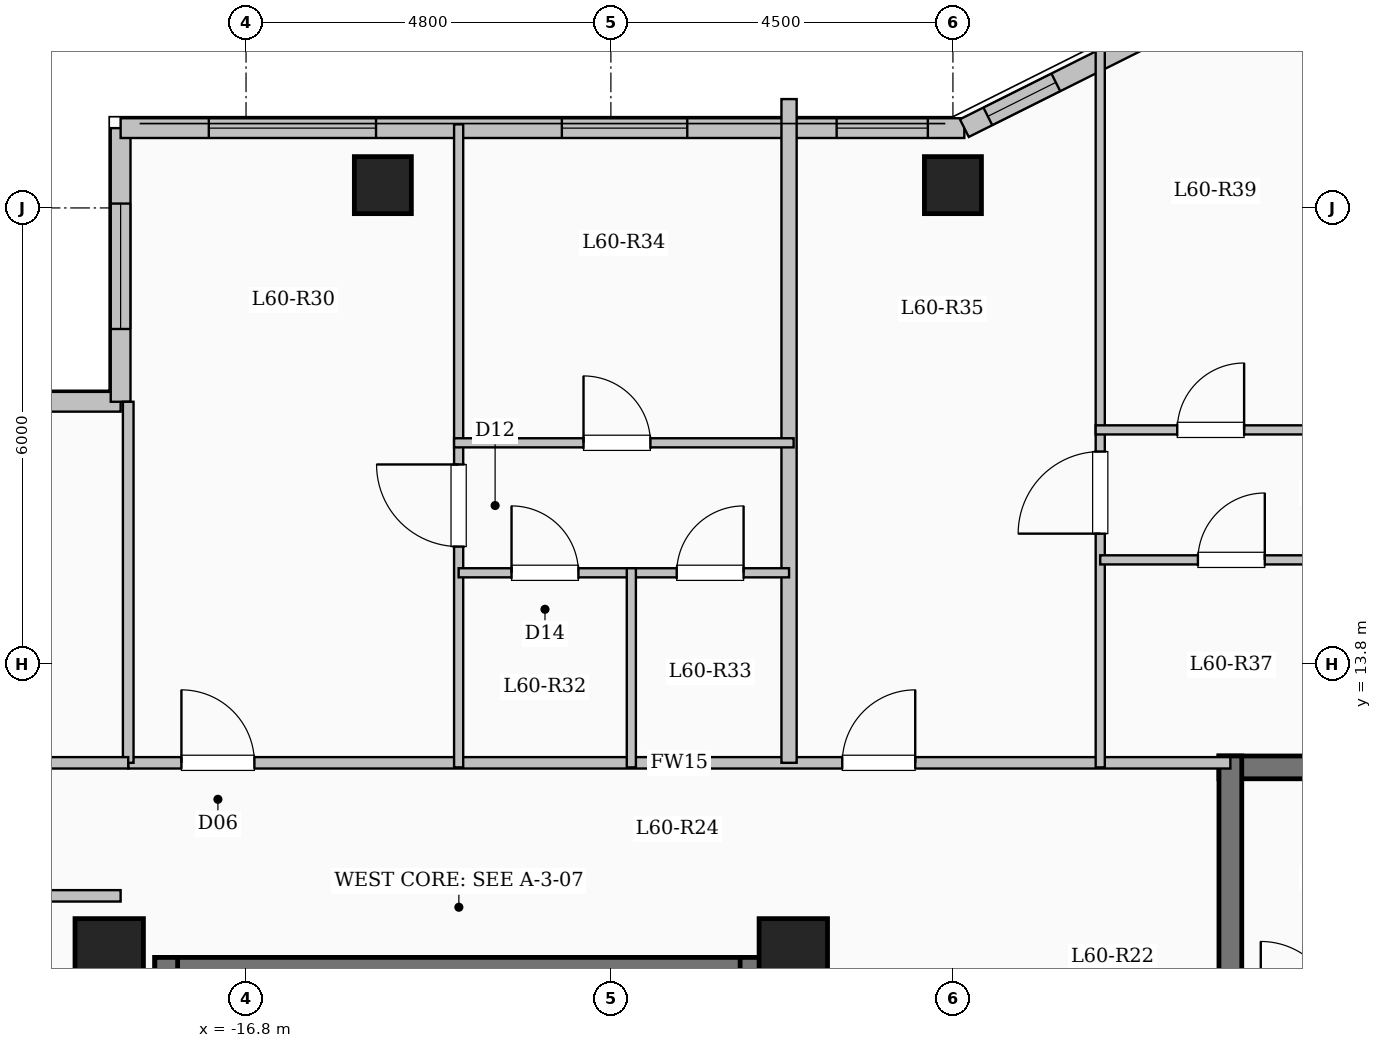
"""IFC4 building model, lengths in metres.
Left out: names, types, materials, properties, quantities, classifications, styles, units other than length and angle.
Written with IfcOpenShell. Run it as: python <this file> out.ifc"""

import sys

from ifc_helpers import new_model, si_unit, direction, frame, frame_2d, origin, origin_2d, place, context, subcontext, project, spatial, rectangle, extrude, element, fill, save


model = new_model("IFC4")
c1 = context("Model", 3, precision=1e-05, world=origin(), true_north=direction((0.0, 1.0)))
c2 = subcontext(c1, "Body", "Model", "MODEL_VIEW")
j1 = project(units=[si_unit("LENGTHUNIT", "METRE"), si_unit("PLANEANGLEUNIT", "RADIAN")], contexts=[c1])
p1 = place(None, origin())
s1 = spatial("IfcSite", under=j1, at=p1, CompositionType="ELEMENT")
p2 = place(p1, origin())
s2 = spatial("IfcBuilding", under=s1, at=p2, CompositionType="ELEMENT")
p3 = place(p2, frame((0.0, 0.0, 220.4)))
s3 = spatial("IfcBuildingStorey", under=s2, at=p3, CompositionType="ELEMENT", Elevation=220.4)
for number, where, z_axis, x_axis in (
    (1, (-9.6, 10.0, 0.0), (0.0, 0.0, 1.0), (1.0, 0.0, 0.0)),
    (2, (-18.6, 10.0, 0.0), (0.0, 0.0, 1.0), (1.0, 0.0, 0.0)),
):
    element("IfcColumn", number, at=place(p3, frame(where, z_axis=z_axis, x_axis=x_axis)), inside=s3, PredefinedType="COLUMN", context=c2, shape_type="SweptSolid", body=[
        extrude(rectangle(XDim=0.9, YDim=0.9, at=origin_2d()), origin(), (0.0, 0.0, 1.0), 3.35),
    ])
for number, where, z_axis, x_axis in (
    (3, (-15.0, 20.1, 0.0), (0.0, 0.0, 1.0), (1.0, 0.0, 0.0)),
    (4, (-7.5, 20.1, 0.0), (0.0, 0.0, 1.0), (1.0, 0.0, 0.0)),
):
    element("IfcColumn", number, at=place(p3, frame(where, z_axis=z_axis, x_axis=x_axis)), inside=s3, PredefinedType="COLUMN", context=c2, shape_type="SweptSolid", body=[
        extrude(rectangle(XDim=0.75, YDim=0.75, at=origin_2d()), origin(), (0.0, 0.0, 1.0), 3.35),
    ])
p4 = place(p3, frame((-23.55, 17.25, 0.0), z_axis=(0.0, 0.0, 1.0), x_axis=(1.0, 0.0, 0.0)))
e5 = element("IfcWall", 5, at=p4, inside=s3, PredefinedType="SOLIDWALL", context=c2, shape_type="SweptSolid", body=[
    extrude(rectangle(XDim=5.1, YDim=0.26, at=frame_2d((2.55, 0.0))), origin(), (0.0, 0.0, 1.0), 3.1),
])
p5 = place(p4, frame((1.575, 0.0, 0.9)))
e6 = element("IfcOpeningElement", 6, at=p5, cuts=e5, PredefinedType="OPENING", context=c2, shape_type="SweptSolid", body=[
    extrude(rectangle(XDim=2.0, YDim=1.7, at=frame_2d((1.0, 0.85))), frame((0.0, 0.14, 0.0), z_axis=(0.0, -1.0, 0.0), x_axis=(1.0, 0.0, 0.0)), (0.0, 0.0, 1.0), 0.28),
])
p6 = place(p3, frame((-18.45, 17.25, 0.0), z_axis=(0.0, 0.0, 1.0), x_axis=(0.0, 1.0, 0.0)))
e7 = element("IfcWall", 7, at=p6, inside=s3, PredefinedType="SOLIDWALL", context=c2, shape_type="SweptSolid", body=[
    extrude(rectangle(XDim=3.6, YDim=0.26, at=frame_2d((1.8, 0.0))), origin(), (0.0, 0.0, 1.0), 3.1),
])
p7 = place(p6, frame((0.958, 0.0, 0.9)))
e8 = element("IfcOpeningElement", 8, at=p7, cuts=e7, PredefinedType="OPENING", context=c2, shape_type="SweptSolid", body=[
    extrude(rectangle(XDim=1.65, YDim=1.6, at=frame_2d((0.825, 0.8))), frame((0.0, 0.14, 0.0), z_axis=(0.0, -1.0, 0.0), x_axis=(1.0, 0.0, 0.0)), (0.0, 0.0, 1.0), 0.28),
])
p8 = place(p3, frame((-18.45, 20.85, 0.0), z_axis=(0.0, 0.0, 1.0), x_axis=(1.0, 0.0, 0.0)))
e9 = element("IfcWall", 9, at=p8, inside=s3, PredefinedType="SOLIDWALL", context=c2, shape_type="SweptSolid", body=[
    extrude(rectangle(XDim=11.1, YDim=0.26, at=frame_2d((5.55, 0.0))), origin(), (0.0, 0.0, 1.0), 3.1),
])
p9 = place(p8, frame((1.16, 0.0, 0.9)))
e10 = element("IfcOpeningElement", 10, at=p9, cuts=e9, PredefinedType="OPENING", context=c2, shape_type="SweptSolid", body=[
    extrude(rectangle(XDim=2.2, YDim=1.75, at=frame_2d((1.1, 0.875))), frame((0.0, 0.14, 0.0), z_axis=(0.0, -1.0, 0.0), x_axis=(1.0, 0.0, 0.0)), (0.0, 0.0, 1.0), 0.28),
])
p10 = place(p8, frame((5.805, 0.0, 0.9)))
e11 = element("IfcOpeningElement", 11, at=p10, cuts=e9, PredefinedType="OPENING", context=c2, shape_type="SweptSolid", body=[
    extrude(rectangle(XDim=1.65, YDim=1.6, at=frame_2d((0.825, 0.8))), frame((0.0, 0.14, 0.0), z_axis=(0.0, -1.0, 0.0), x_axis=(1.0, 0.0, 0.0)), (0.0, 0.0, 1.0), 0.28),
])
p11 = place(p8, frame((9.42, 0.0, 0.95)))
e12 = element("IfcOpeningElement", 12, at=p11, cuts=e9, PredefinedType="OPENING", context=c2, shape_type="SweptSolid", body=[
    extrude(rectangle(XDim=1.2, YDim=1.5, at=frame_2d((0.6, 0.75))), frame((0.0, 0.14, 0.0), z_axis=(0.0, -1.0, 0.0), x_axis=(1.0, 0.0, 0.0)), (0.0, 0.0, 1.0), 0.28),
])
p12 = place(p3, frame((-7.35, 20.85, 0.0), z_axis=(0.0, 0.0, 1.0), x_axis=(0.894427191, 0.4472135955, 0.0)))
e13 = element("IfcWall", 13, at=p12, inside=s3, PredefinedType="SOLIDWALL", context=c2, shape_type="SweptSolid", body=[
    extrude(rectangle(XDim=3.354, YDim=0.26, at=frame_2d((1.677, 0.0))), origin(), (0.0, 0.0, 1.0), 3.1),
])
p13 = place(p12, frame((0.346, 0.0, 0.95)))
e14 = element("IfcOpeningElement", 14, at=p13, cuts=e13, PredefinedType="OPENING", context=c2, shape_type="SweptSolid", body=[
    extrude(rectangle(XDim=1.0, YDim=1.5, at=frame_2d((0.5, 0.75))), frame((0.0, 0.14, 0.0), z_axis=(0.0, -1.0, 0.0), x_axis=(1.0, 0.0, 0.0)), (0.0, 0.0, 1.0), 0.28),
])
p14 = place(p3, frame((-18.0, 9.79, 0.0), z_axis=(0.0, 0.0, 1.0), x_axis=(1.0, 0.0, 0.0)))
e15 = element("IfcWall", 15, at=p14, inside=s3, PredefinedType="SHEAR", context=c2, shape_type="SweptSolid", body=[
    extrude(rectangle(XDim=8.0, YDim=0.3, at=frame_2d((4.0, 0.0))), origin(), (0.0, 0.0, 1.0), 3.35),
])
for number, where, z_axis, x_axis in (
    (16, (-17.85, 6.35, 0.0), (0.0, 0.0, 1.0), (0.0, 1.0, 0.0)),
    (17, (-10.15, 6.35, 0.0), (0.0, 0.0, 1.0), (0.0, 1.0, 0.0)),
):
    element("IfcWall", number, at=place(p3, frame(where, z_axis=z_axis, x_axis=x_axis)), inside=s3, PredefinedType="SHEAR", context=c2, shape_type="SweptSolid", body=[
        extrude(rectangle(XDim=3.59, YDim=0.3, at=frame_2d((1.795, 0.0))), origin(), (0.0, 0.0, 1.0), 3.35),
    ])
p15 = place(p3, frame((-4.0, 12.44, 0.0), z_axis=(0.0, 0.0, 1.0), x_axis=(1.0, 0.0, 0.0)))
e18 = element("IfcWall", 18, at=p15, inside=s3, PredefinedType="SHEAR", context=c2, shape_type="SweptSolid", body=[
    extrude(rectangle(XDim=8.0, YDim=0.3, at=frame_2d((4.0, 0.0))), origin(), (0.0, 0.0, 1.0), 3.35),
])
p16 = place(p3, frame((-3.85, 9.0, 0.0), z_axis=(0.0, 0.0, 1.0), x_axis=(0.0, 1.0, 0.0)))
e19 = element("IfcWall", 19, at=p16, inside=s3, PredefinedType="SHEAR", context=c2, shape_type="SweptSolid", body=[
    extrude(rectangle(XDim=3.59, YDim=0.3, at=frame_2d((1.795, 0.0))), origin(), (0.0, 0.0, 1.0), 3.35),
])
p17 = place(p3, frame((-18.35, 12.5, 0.0), z_axis=(0.0, 0.0, 1.0), x_axis=(1.0, 0.0, 0.0)))
e20 = element("IfcWall", 20, at=p17, inside=s3, PredefinedType="PARTITIONING", context=c2, shape_type="SweptSolid", body=[
    extrude(rectangle(XDim=14.5, YDim=0.15, at=frame_2d((7.25, 0.0))), origin(), (0.0, 0.0, 1.0), 3.1),
])
p18 = place(p17, frame((0.7, 0.0, 0.0)))
e21 = element("IfcOpeningElement", 21, at=p18, cuts=e20, PredefinedType="OPENING", context=c2, shape_type="SweptSolid", body=[
    extrude(rectangle(XDim=0.96, YDim=2.15, at=frame_2d((0.48, 1.075))), frame((0.0, 0.085, 0.0), z_axis=(0.0, -1.0, 0.0), x_axis=(1.0, 0.0, 0.0)), (0.0, 0.0, 1.0), 0.17),
])
p19 = place(p17, frame((9.394, 0.0, 0.0)))
e22 = element("IfcOpeningElement", 22, at=p19, cuts=e20, PredefinedType="OPENING", context=c2, shape_type="SweptSolid", body=[
    extrude(rectangle(XDim=0.96, YDim=2.15, at=frame_2d((0.48, 1.075))), frame((0.0, 0.085, 0.0), z_axis=(0.0, -1.0, 0.0), x_axis=(1.0, 0.0, 0.0)), (0.0, 0.0, 1.0), 0.17),
])
p20 = place(p3, frame((-9.656, 12.5, 0.0), z_axis=(0.0, 0.0, 1.0), x_axis=(0.0, 1.0, 0.0)))
e23 = element("IfcWall", 23, at=p20, inside=s3, PredefinedType="SOLIDWALL", context=c2, shape_type="SweptSolid", body=[
    extrude(rectangle(XDim=8.732, YDim=0.2, at=frame_2d((4.366, 0.0))), origin(), (0.0, 0.0, 1.0), 3.1),
])
p21 = place(p3, frame((-14.003, 12.44, 0.0), z_axis=(0.0, 0.0, 1.0), x_axis=(0.0, 1.0, 0.0)))
e24 = element("IfcWall", 24, at=p21, inside=s3, PredefinedType="PARTITIONING", context=c2, shape_type="SweptSolid", body=[
    extrude(rectangle(XDim=8.46, YDim=0.12, at=frame_2d((4.23, 0.0))), origin(), (0.0, 0.0, 1.0), 3.1),
])
p22 = place(p21, frame((2.905, 0.0, 0.0)))
e25 = element("IfcOpeningElement", 25, at=p22, cuts=e24, PredefinedType="OPENING", context=c2, shape_type="SweptSolid", body=[
    extrude(rectangle(XDim=1.08, YDim=2.15, at=frame_2d((0.54, 1.075))), frame((0.0, 0.07, 0.0), z_axis=(0.0, -1.0, 0.0), x_axis=(1.0, 0.0, 0.0)), (0.0, 0.0, 1.0), 0.14),
])
p23 = place(p3, frame((-14.003, 15.0, 0.0), z_axis=(0.0, 0.0, 1.0), x_axis=(1.0, 0.0, 0.0)))
e26 = element("IfcWall", 26, at=p23, inside=s3, PredefinedType="PARTITIONING", context=c2, shape_type="SweptSolid", body=[
    extrude(rectangle(XDim=2.272, YDim=0.12, at=frame_2d((1.136, 0.0))), origin(), (0.0, 0.0, 1.0), 3.1),
])
p24 = place(p23, frame((0.696, 0.0, 0.0)))
e27 = element("IfcOpeningElement", 27, at=p24, cuts=e26, PredefinedType="OPENING", context=c2, shape_type="SweptSolid", body=[
    extrude(rectangle(XDim=0.88, YDim=2.1, at=frame_2d((0.44, 1.05))), frame((0.0, 0.07, 0.0), z_axis=(0.0, -1.0, 0.0), x_axis=(1.0, 0.0, 0.0)), (0.0, 0.0, 1.0), 0.14),
])
p25 = place(p3, frame((-11.731, 15.0, 0.0), z_axis=(0.0, 0.0, 1.0), x_axis=(1.0, 0.0, 0.0)))
e28 = element("IfcWall", 28, at=p25, inside=s3, PredefinedType="PARTITIONING", context=c2, shape_type="SweptSolid", body=[
    extrude(rectangle(XDim=2.075, YDim=0.12, at=frame_2d((1.038, 0.0))), origin(), (0.0, 0.0, 1.0), 3.1),
])
p26 = place(p25, frame((0.597, 0.0, 0.0)))
e29 = element("IfcOpeningElement", 29, at=p26, cuts=e28, PredefinedType="OPENING", context=c2, shape_type="SweptSolid", body=[
    extrude(rectangle(XDim=0.88, YDim=2.1, at=frame_2d((0.44, 1.05))), frame((0.0, 0.07, 0.0), z_axis=(0.0, -1.0, 0.0), x_axis=(1.0, 0.0, 0.0)), (0.0, 0.0, 1.0), 0.14),
])
p27 = place(p3, frame((-14.063, 16.71, 0.0), z_axis=(0.0, 0.0, 1.0), x_axis=(1.0, 0.0, 0.0)))
e30 = element("IfcWall", 30, at=p27, inside=s3, PredefinedType="PARTITIONING", context=c2, shape_type="SweptSolid", body=[
    extrude(rectangle(XDim=4.467, YDim=0.12, at=frame_2d((2.233, 0.0))), origin(), (0.0, 0.0, 1.0), 2.725),
])
p28 = place(p27, frame((1.703, 0.0, 0.0)))
e31 = element("IfcOpeningElement", 31, at=p28, cuts=e30, PredefinedType="OPENING", context=c2, shape_type="SweptSolid", body=[
    extrude(rectangle(XDim=0.88, YDim=2.1, at=frame_2d((0.44, 1.05))), frame((0.0, 0.07, 0.0), z_axis=(0.0, -1.0, 0.0), x_axis=(1.0, 0.0, 0.0)), (0.0, 0.0, 1.0), 0.14),
])
p29 = place(p3, frame((-11.731, 12.44, 0.0), z_axis=(0.0, 0.0, 1.0), x_axis=(0.0, 1.0, 0.0)))
e32 = element("IfcWall", 32, at=p29, inside=s3, PredefinedType="PARTITIONING", context=c2, shape_type="SweptSolid", body=[
    extrude(rectangle(XDim=2.62, YDim=0.12, at=frame_2d((1.31, 0.0))), origin(), (0.0, 0.0, 1.0), 3.1),
])
p30 = place(p3, frame((-5.562, 12.44, 0.0), z_axis=(0.0, 0.0, 1.0), x_axis=(0.0, 1.0, 0.0)))
e33 = element("IfcWall", 33, at=p30, inside=s3, PredefinedType="PARTITIONING", context=c2, shape_type="SweptSolid", body=[
    extrude(rectangle(XDim=9.801, YDim=0.12, at=frame_2d((4.9, 0.0))), origin(), (0.0, 0.0, 1.0), 3.1),
])
p31 = place(p30, frame((3.075, 0.0, 0.0)))
e34 = element("IfcOpeningElement", 34, at=p31, cuts=e33, PredefinedType="OPENING", context=c2, shape_type="SweptSolid", body=[
    extrude(rectangle(XDim=1.08, YDim=2.15, at=frame_2d((0.54, 1.075))), frame((0.0, 0.07, 0.0), z_axis=(0.0, -1.0, 0.0), x_axis=(1.0, 0.0, 0.0)), (0.0, 0.0, 1.0), 0.14),
])
p32 = place(p3, frame((-5.562, 15.17, 0.0), z_axis=(0.0, 0.0, 1.0), x_axis=(1.0, 0.0, 0.0)))
e35 = element("IfcWall", 35, at=p32, inside=s3, PredefinedType="PARTITIONING", context=c2, shape_type="SweptSolid", body=[
    extrude(rectangle(XDim=3.45, YDim=0.12, at=frame_2d((1.725, 0.0))), origin(), (0.0, 0.0, 1.0), 3.1),
])
p33 = place(p32, frame((1.285, 0.0, 0.0)))
e36 = element("IfcOpeningElement", 36, at=p33, cuts=e35, PredefinedType="OPENING", context=c2, shape_type="SweptSolid", body=[
    extrude(rectangle(XDim=0.88, YDim=2.1, at=frame_2d((0.44, 1.05))), frame((0.0, 0.07, 0.0), z_axis=(0.0, -1.0, 0.0), x_axis=(1.0, 0.0, 0.0)), (0.0, 0.0, 1.0), 0.14),
])
p34 = place(p3, frame((-5.622, 16.88, 0.0), z_axis=(0.0, 0.0, 1.0), x_axis=(1.0, 0.0, 0.0)))
e37 = element("IfcWall", 37, at=p34, inside=s3, PredefinedType="PARTITIONING", context=c2, shape_type="SweptSolid", body=[
    extrude(rectangle(XDim=6.232, YDim=0.12, at=frame_2d((3.116, 0.0))), origin(), (0.0, 0.0, 1.0), 2.725),
])
p35 = place(p34, frame((1.073, 0.0, 0.0)))
e38 = element("IfcOpeningElement", 38, at=p35, cuts=e37, PredefinedType="OPENING", context=c2, shape_type="SweptSolid", body=[
    extrude(rectangle(XDim=0.88, YDim=2.1, at=frame_2d((0.44, 1.05))), frame((0.0, 0.07, 0.0), z_axis=(0.0, -1.0, 0.0), x_axis=(1.0, 0.0, 0.0)), (0.0, 0.0, 1.0), 0.14),
])
p36 = place(p34, frame((4.099, 0.0, 0.0)))
e39 = element("IfcOpeningElement", 39, at=p36, cuts=e37, PredefinedType="OPENING", context=c2, shape_type="SweptSolid", body=[
    extrude(rectangle(XDim=0.88, YDim=2.1, at=frame_2d((0.44, 1.05))), frame((0.0, 0.07, 0.0), z_axis=(0.0, -1.0, 0.0), x_axis=(1.0, 0.0, 0.0)), (0.0, 0.0, 1.0), 0.14),
])
p37 = place(p3, frame((-23.58, 10.75, 0.0), z_axis=(0.0, 0.0, 1.0), x_axis=(1.0, 0.0, 0.0)))
e40 = element("IfcWall", 40, at=p37, inside=s3, PredefinedType="PARTITIONING", context=c2, shape_type="SweptSolid", body=[
    extrude(rectangle(XDim=5.13, YDim=0.15, at=frame_2d((2.565, 0.0))), origin(), (0.0, 0.0, 1.0), 3.1),
])
p38 = place(p3, frame((-18.35, 12.5, 0.0), z_axis=(0.0, 0.0, 1.0), x_axis=(0.0, 1.0, 0.0)))
e41 = element("IfcWall", 41, at=p38, inside=s3, PredefinedType="PARTITIONING", context=c2, shape_type="SweptSolid", body=[
    extrude(rectangle(XDim=4.75, YDim=0.14, at=frame_2d((2.375, 0.0))), origin(), (0.0, 0.0, 1.0), 3.1),
])
p39 = place(p3, frame((-23.58, 12.5, 0.0), z_axis=(0.0, 0.0, 1.0), x_axis=(1.0, 0.0, 0.0)))
e42 = element("IfcWall", 42, at=p39, inside=s3, PredefinedType="PARTITIONING", context=c2, shape_type="SweptSolid", body=[
    extrude(rectangle(XDim=5.23, YDim=0.15, at=frame_2d((2.615, 0.0))), origin(), (0.0, 0.0, 1.0), 3.1),
])
p40 = place(p39, frame((2.14, 0.0, 0.0)))
e43 = element("IfcOpeningElement", 43, at=p40, cuts=e42, PredefinedType="OPENING", context=c2, shape_type="SweptSolid", body=[
    extrude(rectangle(XDim=0.95, YDim=2.15, at=frame_2d((0.475, 1.075))), frame((0.0, 0.085, 0.0), z_axis=(0.0, -1.0, 0.0), x_axis=(1.0, 0.0, 0.0)), (0.0, 0.0, 1.0), 0.17),
])
p41 = place(p7, origin())
e44 = element("IfcWindow", 44, at=p41, inside=s3, PartitioningType="SINGLE_PANEL", PredefinedType="WINDOW", context=c2, shape_type="SweptSolid", body=[
    extrude(rectangle(XDim=1.65, YDim=1.6, at=frame_2d((0.825, 0.8))), frame((0.0, 0.03, 0.0), z_axis=(0.0, -1.0, 0.0), x_axis=(1.0, 0.0, 0.0)), (0.0, 0.0, 1.0), 0.06),
])
fill(e8, e44)
p42 = place(p9, origin())
e45 = element("IfcWindow", 45, at=p42, inside=s3, PartitioningType="SINGLE_PANEL", PredefinedType="WINDOW", context=c2, shape_type="SweptSolid", body=[
    extrude(rectangle(XDim=2.2, YDim=1.75, at=frame_2d((1.1, 0.875))), frame((0.0, 0.03, 0.0), z_axis=(0.0, -1.0, 0.0), x_axis=(1.0, 0.0, 0.0)), (0.0, 0.0, 1.0), 0.06),
])
fill(e10, e45)
p43 = place(p10, origin())
e46 = element("IfcWindow", 46, at=p43, inside=s3, PartitioningType="SINGLE_PANEL", PredefinedType="WINDOW", context=c2, shape_type="SweptSolid", body=[
    extrude(rectangle(XDim=1.65, YDim=1.6, at=frame_2d((0.825, 0.8))), frame((0.0, 0.03, 0.0), z_axis=(0.0, -1.0, 0.0), x_axis=(1.0, 0.0, 0.0)), (0.0, 0.0, 1.0), 0.06),
])
fill(e11, e46)
p44 = place(p11, origin())
e47 = element("IfcWindow", 47, at=p44, inside=s3, PartitioningType="SINGLE_PANEL", PredefinedType="WINDOW", context=c2, shape_type="SweptSolid", body=[
    extrude(rectangle(XDim=1.2, YDim=1.5, at=frame_2d((0.6, 0.75))), frame((0.0, 0.03, 0.0), z_axis=(0.0, -1.0, 0.0), x_axis=(1.0, 0.0, 0.0)), (0.0, 0.0, 1.0), 0.06),
])
fill(e12, e47)
p45 = place(p13, origin())
e48 = element("IfcWindow", 48, at=p45, inside=s3, PartitioningType="SINGLE_PANEL", PredefinedType="WINDOW", context=c2, shape_type="SweptSolid", body=[
    extrude(rectangle(XDim=1.0, YDim=1.5, at=frame_2d((0.5, 0.75))), frame((0.0, 0.03, 0.0), z_axis=(0.0, -1.0, 0.0), x_axis=(1.0, 0.0, 0.0)), (0.0, 0.0, 1.0), 0.06),
])
fill(e14, e48)
p46 = place(p18, origin())
e49 = element("IfcDoor", 49, at=p46, inside=s3, OperationType="SINGLE_SWING_LEFT", PredefinedType="DOOR", context=c2, shape_type="SweptSolid", body=[
    extrude(rectangle(XDim=0.96, YDim=2.15, at=frame_2d((0.48, 1.075))), frame((0.0, 0.025, 0.0), z_axis=(0.0, -1.0, 0.0), x_axis=(1.0, 0.0, 0.0)), (0.0, 0.0, 1.0), 0.05),
])
fill(e21, e49)
p47 = place(p22, origin())
e50 = element("IfcDoor", 50, at=p47, inside=s3, OperationType="SINGLE_SWING_RIGHT", PredefinedType="DOOR", context=c2, shape_type="SweptSolid", body=[
    extrude(rectangle(XDim=1.08, YDim=2.15, at=frame_2d((0.54, 1.075))), frame((0.0, 0.025, 0.0), z_axis=(0.0, -1.0, 0.0), x_axis=(1.0, 0.0, 0.0)), (0.0, 0.0, 1.0), 0.05),
])
fill(e25, e50)
p48 = place(p24, origin())
e51 = element("IfcDoor", 51, at=p48, inside=s3, OperationType="SINGLE_SWING_LEFT", PredefinedType="DOOR", context=c2, shape_type="SweptSolid", body=[
    extrude(rectangle(XDim=0.88, YDim=2.1, at=frame_2d((0.44, 1.05))), frame((0.0, 0.025, 0.0), z_axis=(0.0, -1.0, 0.0), x_axis=(1.0, 0.0, 0.0)), (0.0, 0.0, 1.0), 0.05),
])
fill(e27, e51)
p49 = place(p26, origin())
e52 = element("IfcDoor", 52, at=p49, inside=s3, OperationType="SINGLE_SWING_RIGHT", PredefinedType="DOOR", context=c2, shape_type="SweptSolid", body=[
    extrude(rectangle(XDim=0.88, YDim=2.1, at=frame_2d((0.44, 1.05))), frame((0.0, 0.025, 0.0), z_axis=(0.0, -1.0, 0.0), x_axis=(1.0, 0.0, 0.0)), (0.0, 0.0, 1.0), 0.05),
])
fill(e29, e52)
p50 = place(p28, origin())
e53 = element("IfcDoor", 53, at=p50, inside=s3, OperationType="SINGLE_SWING_LEFT", PredefinedType="DOOR", context=c2, shape_type="SweptSolid", body=[
    extrude(rectangle(XDim=0.88, YDim=2.1, at=frame_2d((0.44, 1.05))), frame((0.0, 0.025, 0.0), z_axis=(0.0, -1.0, 0.0), x_axis=(1.0, 0.0, 0.0)), (0.0, 0.0, 1.0), 0.05),
])
fill(e31, e53)
p51 = place(p19, origin())
e54 = element("IfcDoor", 54, at=p51, inside=s3, OperationType="SINGLE_SWING_RIGHT", PredefinedType="DOOR", context=c2, shape_type="SweptSolid", body=[
    extrude(rectangle(XDim=0.96, YDim=2.15, at=frame_2d((0.48, 1.075))), frame((0.0, 0.025, 0.0), z_axis=(0.0, -1.0, 0.0), x_axis=(1.0, 0.0, 0.0)), (0.0, 0.0, 1.0), 0.05),
])
fill(e22, e54)
p52 = place(p31, origin())
e55 = element("IfcDoor", 55, at=p52, inside=s3, OperationType="SINGLE_SWING_LEFT", PredefinedType="DOOR", context=c2, shape_type="SweptSolid", body=[
    extrude(rectangle(XDim=1.08, YDim=2.15, at=frame_2d((0.54, 1.075))), frame((0.0, 0.025, 0.0), z_axis=(0.0, -1.0, 0.0), x_axis=(1.0, 0.0, 0.0)), (0.0, 0.0, 1.0), 0.05),
])
fill(e34, e55)
p53 = place(p33, origin())
e56 = element("IfcDoor", 56, at=p53, inside=s3, OperationType="SINGLE_SWING_RIGHT", PredefinedType="DOOR", context=c2, shape_type="SweptSolid", body=[
    extrude(rectangle(XDim=0.88, YDim=2.1, at=frame_2d((0.44, 1.05))), frame((0.0, 0.025, 0.0), z_axis=(0.0, -1.0, 0.0), x_axis=(1.0, 0.0, 0.0)), (0.0, 0.0, 1.0), 0.05),
])
fill(e36, e56)
p54 = place(p35, origin())
e57 = element("IfcDoor", 57, at=p54, inside=s3, OperationType="SINGLE_SWING_RIGHT", PredefinedType="DOOR", context=c2, shape_type="SweptSolid", body=[
    extrude(rectangle(XDim=0.88, YDim=2.1, at=frame_2d((0.44, 1.05))), frame((0.0, 0.025, 0.0), z_axis=(0.0, -1.0, 0.0), x_axis=(1.0, 0.0, 0.0)), (0.0, 0.0, 1.0), 0.05),
])
fill(e38, e57)
save(model, sys.argv[1])
